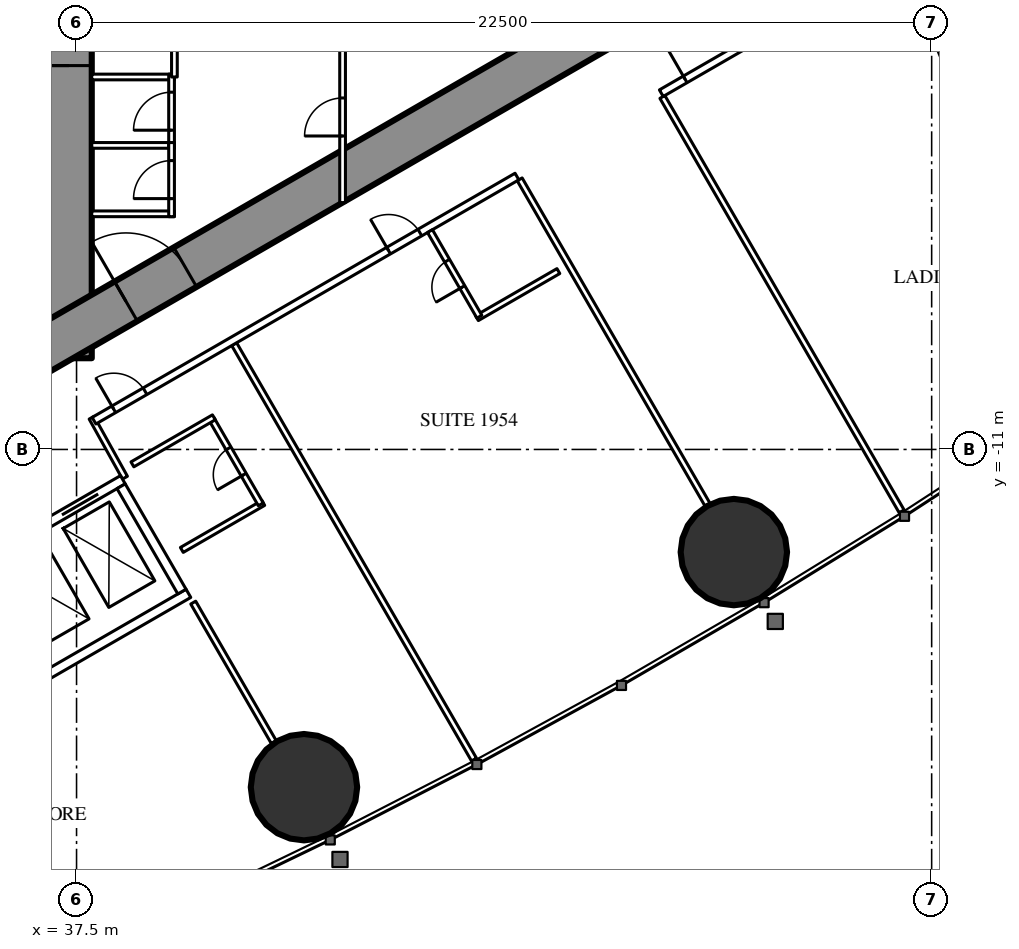
"""IFC4 building model, lengths in metres.
Left out: names, types, materials, properties, quantities, classifications, styles, units other than length and angle.
Written with IfcOpenShell. Run it as: python <this file> out.ifc"""

import sys

from ifc_helpers import new_model, si_unit, direction, frame, frame_2d, origin, origin_2d, place, context, subcontext, project, spatial, rectangle, hollow_circle, extrude, element, fill, save


model = new_model("IFC4")
c1 = context("Model", 3, precision=1e-05, world=origin(), true_north=direction((0.0, 1.0)))
c2 = subcontext(c1, "Body", "Model", "MODEL_VIEW")
j1 = project(units=[si_unit("LENGTHUNIT", "METRE"), si_unit("PLANEANGLEUNIT", "RADIAN")], contexts=[c1])
p1 = place(None, origin())
s1 = spatial("IfcSite", under=j1, at=p1, CompositionType="ELEMENT")
p2 = place(p1, origin())
s2 = spatial("IfcBuilding", under=s1, at=p2, CompositionType="ELEMENT")
p3 = place(p2, frame((0.0, 0.0, 74.0)))
s3 = spatial("IfcBuildingStorey", under=s2, at=p3, CompositionType="ELEMENT", Elevation=74.0)
for number, where, z_axis, x_axis in (
    (1, (43.484, -19.886, 0.0), (0.0, 0.0, 1.0), (1.0, 0.0, 0.0)),
    (2, (54.795, -13.701, 0.0), (0.0, 0.0, 1.0), (1.0, 0.0, 0.0)),
):
    element("IfcColumn", number, at=place(p3, frame(where, z_axis=z_axis, x_axis=x_axis)), inside=s3, PredefinedType="COLUMN", context=c2, shape_type="SweptSolid", body=[
        extrude(hollow_circle(Radius=1.4, WallThickness=0.12, at=origin_2d()), origin(), (0.0, 0.0, 1.0), 3.5),
    ])
p4 = place(p3, frame((61.5, 0.0, 0.0), z_axis=(0.0, 0.0, 1.0), x_axis=(1.0, 0.0, 0.0)))
e3 = element("IfcColumn", 3, at=p4, inside=s3, PredefinedType="COLUMN", context=c2, shape_type="SweptSolid", body=[
    extrude(hollow_circle(Radius=1.4, WallThickness=0.1, at=origin_2d()), origin(), (0.0, 0.0, 1.0), 3.5),
])
p5 = place(p3, frame((37.3, -8.6, 0.0), z_axis=(0.0, 0.0, 1.0), x_axis=(0.0, 1.0, 0.0)))
e4 = element("IfcWall", 4, at=p5, inside=s3, PredefinedType="SHEAR", context=c2, shape_type="SweptSolid", body=[
    extrude(rectangle(XDim=17.2, YDim=1.2, at=frame_2d((8.6, 0.0))), origin(), (0.0, 0.0, 1.0), 3.5),
])
p6 = place(p5, frame((7.7, 0.0, 0.0)))
e5 = element("IfcOpeningElement", 5, at=p6, cuts=e4, PredefinedType="OPENING", context=c2, shape_type="SweptSolid", body=[
    extrude(rectangle(XDim=1.8, YDim=2.2, at=frame_2d((0.9, 1.1))), frame((0.0, 0.61, 0.0), z_axis=(0.0, -1.0, 0.0), x_axis=(1.0, 0.0, 0.0)), (0.0, 0.0, 1.0), 1.22),
])
p7 = place(p3, frame((27.2, -13.8, 0.0), z_axis=(0.0, 0.0, 1.0), x_axis=(0.866027159892, 0.499996958321, 0.0)))
e6 = element("IfcWall", 6, at=p7, inside=s3, PredefinedType="SHEAR", context=c2, shape_type="SweptSolid", body=[
    extrude(rectangle(XDim=27.947, YDim=1.2, at=frame_2d((13.973, 0.0))), origin(), (0.0, 0.0, 1.0), 3.5),
])
p8 = place(p7, frame((4.6, 0.0, 0.0)))
e7 = element("IfcOpeningElement", 7, at=p8, cuts=e6, PredefinedType="OPENING", context=c2, shape_type="SweptSolid", body=[
    extrude(rectangle(XDim=1.0, YDim=2.2, at=frame_2d((0.5, 1.1))), frame((0.0, 0.61, 0.0), z_axis=(0.0, -1.0, 0.0), x_axis=(1.0, 0.0, 0.0)), (0.0, 0.0, 1.0), 1.22),
])
p9 = place(p7, frame((13.395, 0.0, 0.0)))
e8 = element("IfcOpeningElement", 8, at=p9, cuts=e6, PredefinedType="OPENING", context=c2, shape_type="SweptSolid", body=[
    extrude(rectangle(XDim=1.8, YDim=2.2, at=frame_2d((0.9, 1.1))), frame((0.0, 0.61, 0.0), z_axis=(0.0, -1.0, 0.0), x_axis=(1.0, 0.0, 0.0)), (0.0, 0.0, 1.0), 1.22),
])
p10 = place(p3, frame((41.647, -8.23, 0.0), z_axis=(0.0, 0.0, 1.0), x_axis=(0.49998590462, -0.866033541603, 0.0)))
e9 = element("IfcWall", 9, at=p10, inside=s3, PredefinedType="PARTITIONING", context=c2, shape_type="SweptSolid", body=[
    extrude(rectangle(XDim=12.621, YDim=0.15, at=frame_2d((6.311, 0.0))), origin(), (0.0, 0.0, 1.0), 3.25),
])
p11 = place(p3, frame((49.159, -3.893, 0.0), z_axis=(0.0, 0.0, 1.0), x_axis=(0.499998773722, -0.866026111775, 0.0)))
e10 = element("IfcWall", 10, at=p11, inside=s3, PredefinedType="PARTITIONING", context=c2, shape_type="SweptSolid", body=[
    extrude(rectangle(XDim=9.892, YDim=0.15, at=frame_2d((4.946, 0.0))), origin(), (0.0, 0.0, 1.0), 2.25),
])
p12 = place(p3, frame((52.915, -1.725, 0.0), z_axis=(0.0, 0.0, 1.0), x_axis=(0.499997163113, -0.866027041656, 0.0)))
e11 = element("IfcWall", 11, at=p12, inside=s3, PredefinedType="PARTITIONING", context=c2, shape_type="SweptSolid", body=[
    extrude(rectangle(XDim=12.591, YDim=0.15, at=frame_2d((6.295, 0.0))), origin(), (0.0, 0.0, 1.0), 3.25),
])
p13 = place(p3, frame((40.57, -15.03, 0.0), z_axis=(0.0, 0.0, 1.0), x_axis=(0.500012993597, -0.866017901798, 0.0)))
e12 = element("IfcWall", 12, at=p13, inside=s3, PredefinedType="PARTITIONING", context=c2, shape_type="SweptSolid", body=[
    extrude(rectangle(XDim=4.243, YDim=0.15, at=frame_2d((2.122, 0.0))), origin(), (0.0, 0.0, 1.0), 3.25),
])
p14 = place(p3, frame((38.773, -11.742, 0.0), z_axis=(0.0, 0.0, 1.0), x_axis=(-0.485528096672, 0.8742210632, 0.0)))
e13 = element("IfcWall", 13, at=p14, inside=s3, PredefinedType="PARTITIONING", context=c2, shape_type="SweptSolid", body=[
    extrude(rectangle(XDim=1.805, YDim=0.15, at=frame_2d((0.903, 0.0))), origin(), (0.0, 0.0, 1.0), 3.25),
])
p15 = place(p3, frame((37.96, -10.243, 0.0), z_axis=(0.0, 0.0, 1.0), x_axis=(0.866030548046, 0.499991089772, 0.0)))
e14 = element("IfcWall", 14, at=p15, inside=s3, PredefinedType="PARTITIONING", context=c2, shape_type="SweptSolid", body=[
    extrude(rectangle(XDim=12.849, YDim=0.2, at=frame_2d((6.425, 0.0))), origin(), (0.0, 0.0, 1.0), 3.25),
])
p16 = place(p15, frame((8.949, 0.0, 0.0)))
e15 = element("IfcOpeningElement", 15, at=p16, cuts=e14, PredefinedType="OPENING", context=c2, shape_type="SweptSolid", body=[
    extrude(rectangle(XDim=0.95, YDim=2.2, at=frame_2d((0.475, 1.1))), frame((0.0, 0.11, 0.0), z_axis=(0.0, -1.0, 0.0), x_axis=(1.0, 0.0, 0.0)), (0.0, 0.0, 1.0), 0.22),
])
p17 = place(p15, frame((0.6, 0.0, 0.0)))
e16 = element("IfcOpeningElement", 16, at=p17, cuts=e14, PredefinedType="OPENING", context=c2, shape_type="SweptSolid", body=[
    extrude(rectangle(XDim=0.95, YDim=2.2, at=frame_2d((0.475, 1.1))), frame((0.0, 0.11, 0.0), z_axis=(0.0, -1.0, 0.0), x_axis=(1.0, 0.0, 0.0)), (0.0, 0.0, 1.0), 0.22),
])
p18 = place(p3, frame((52.886, -1.626, 0.0), z_axis=(0.0, 0.0, 1.0), x_axis=(0.866030540913, 0.499991102127, 0.0)))
e17 = element("IfcWall", 17, at=p18, inside=s3, PredefinedType="PARTITIONING", context=c2, shape_type="SweptSolid", body=[
    extrude(rectangle(XDim=3.251, YDim=0.2, at=frame_2d((1.626, 0.0))), origin(), (0.0, 0.0, 1.0), 3.25),
])
p19 = place(p18, frame((0.726, 0.0, 0.0)))
e18 = element("IfcOpeningElement", 18, at=p19, cuts=e17, PredefinedType="OPENING", context=c2, shape_type="SweptSolid", body=[
    extrude(rectangle(XDim=1.8, YDim=2.2, at=frame_2d((0.9, 1.1))), frame((0.0, 0.11, 0.0), z_axis=(0.0, -1.0, 0.0), x_axis=(1.0, 0.0, 0.0)), (0.0, 0.0, 1.0), 0.22),
])
p20 = place(p3, frame((48.035, -7.545, 0.0), z_axis=(0.0, 0.0, 1.0), x_axis=(0.866006523861, 0.500032699561, 0.0)))
e19 = element("IfcWall", 19, at=p20, inside=s3, PredefinedType="PARTITIONING", context=c2, shape_type="SweptSolid", body=[
    extrude(rectangle(XDim=2.475, YDim=0.15, at=frame_2d((1.237, 0.0))), origin(), (0.0, 0.0, 1.0), 3.25),
])
p21 = place(p3, frame((46.8, -5.255, 0.0), z_axis=(0.0, 0.0, 1.0), x_axis=(0.500006934395, -0.866021400173, 0.0)))
e20 = element("IfcWall", 20, at=p21, inside=s3, PredefinedType="PARTITIONING", context=c2, shape_type="SweptSolid", body=[
    extrude(rectangle(XDim=2.6, YDim=0.15, at=frame_2d((1.3, 0.0))), origin(), (0.0, 0.0, 1.0), 3.25),
])
p22 = place(p21, frame((0.9, 0.0, 0.0)))
e21 = element("IfcOpeningElement", 21, at=p22, cuts=e20, PredefinedType="OPENING", context=c2, shape_type="SweptSolid", body=[
    extrude(rectangle(XDim=0.8, YDim=2.2, at=frame_2d((0.4, 1.1))), frame((0.0, 0.085, 0.0), z_axis=(0.0, -1.0, 0.0), x_axis=(1.0, 0.0, 0.0)), (0.0, 0.0, 1.0), 0.17),
])
p23 = place(p3, frame((40.27, -13.644, 0.0), z_axis=(0.0, 0.0, 1.0), x_axis=(0.866031185235, 0.4999899861, 0.0)))
e22 = element("IfcWall", 22, at=p23, inside=s3, PredefinedType="PARTITIONING", context=c2, shape_type="SweptSolid", body=[
    extrude(rectangle(XDim=2.475, YDim=0.15, at=frame_2d((1.238, 0.0))), origin(), (0.0, 0.0, 1.0), 3.25),
])
p24 = place(p3, frame((41.048, -10.193, 0.0), z_axis=(0.0, 0.0, 1.0), x_axis=(0.500047596559, -0.865997922154, 0.0)))
e23 = element("IfcWall", 23, at=p24, inside=s3, PredefinedType="PARTITIONING", context=c2, shape_type="SweptSolid", body=[
    extrude(rectangle(XDim=2.6, YDim=0.15, at=frame_2d((1.3, 0.0))), origin(), (0.0, 0.0, 1.0), 3.25),
])
p25 = place(p24, frame((0.9, 0.0, 0.0)))
e24 = element("IfcOpeningElement", 24, at=p25, cuts=e23, PredefinedType="OPENING", context=c2, shape_type="SweptSolid", body=[
    extrude(rectangle(XDim=0.8, YDim=2.2, at=frame_2d((0.4, 1.1))), frame((0.0, 0.085, 0.0), z_axis=(0.0, -1.0, 0.0), x_axis=(1.0, 0.0, 0.0)), (0.0, 0.0, 1.0), 0.17),
])
p26 = place(p3, frame((38.97, -11.393, 0.0), z_axis=(0.0, 0.0, 1.0), x_axis=(0.866031185235, 0.4999899861, 0.0)))
e25 = element("IfcWall", 25, at=p26, inside=s3, PredefinedType="PARTITIONING", context=c2, shape_type="SweptSolid", body=[
    extrude(rectangle(XDim=2.475, YDim=0.15, at=frame_2d((1.238, 0.0))), origin(), (0.0, 0.0, 1.0), 3.25),
])
for number, where, z_axis, x_axis in (
    (26, (37.9, -1.2, 0.0), (0.0, 0.0, 1.0), (1.0, 0.0, 0.0)),
    (27, (37.9, -3.0, 0.0), (0.0, 0.0, 1.0), (1.0, 0.0, 0.0)),
    (28, (37.9, -4.8, 0.0), (0.0, 0.0, 1.0), (1.0, 0.0, 0.0)),
):
    element("IfcWall", number, at=place(p3, frame(where, z_axis=z_axis, x_axis=x_axis)), inside=s3, PredefinedType="PARTITIONING", context=c2, shape_type="SweptSolid", body=[
        extrude(rectangle(XDim=2.175, YDim=0.15, at=frame_2d((1.087, 0.0))), origin(), (0.0, 0.0, 1.0), 3.25),
    ])
p27 = place(p3, frame((40.0, -3.075, 0.0), z_axis=(0.0, 0.0, 1.0), x_axis=(0.0, 1.0, 0.0)))
e29 = element("IfcWall", 29, at=p27, inside=s3, PredefinedType="PARTITIONING", context=c2, shape_type="SweptSolid", body=[
    extrude(rectangle(XDim=1.95, YDim=0.15, at=frame_2d((0.975, 0.0))), origin(), (0.0, 0.0, 1.0), 3.25),
])
p28 = place(p27, frame((0.475, 0.0, 0.0)))
e30 = element("IfcOpeningElement", 30, at=p28, cuts=e29, PredefinedType="OPENING", context=c2, shape_type="SweptSolid", body=[
    extrude(rectangle(XDim=1.0, YDim=2.2, at=frame_2d((0.5, 1.1))), frame((0.0, 0.085, 0.0), z_axis=(0.0, -1.0, 0.0), x_axis=(1.0, 0.0, 0.0)), (0.0, 0.0, 1.0), 0.17),
])
p29 = place(p3, frame((40.0, -4.875, 0.0), z_axis=(0.0, 0.0, 1.0), x_axis=(0.0, 1.0, 0.0)))
e31 = element("IfcWall", 31, at=p29, inside=s3, PredefinedType="PARTITIONING", context=c2, shape_type="SweptSolid", body=[
    extrude(rectangle(XDim=1.95, YDim=0.15, at=frame_2d((0.975, 0.0))), origin(), (0.0, 0.0, 1.0), 3.25),
])
p30 = place(p29, frame((0.475, 0.0, 0.0)))
e32 = element("IfcOpeningElement", 32, at=p30, cuts=e31, PredefinedType="OPENING", context=c2, shape_type="SweptSolid", body=[
    extrude(rectangle(XDim=1.0, YDim=2.2, at=frame_2d((0.5, 1.1))), frame((0.0, 0.085, 0.0), z_axis=(0.0, -1.0, 0.0), x_axis=(1.0, 0.0, 0.0)), (0.0, 0.0, 1.0), 0.17),
])
p31 = place(p3, frame((40.075, -1.2, 0.0), z_axis=(0.0, 0.0, 1.0), x_axis=(0.0, 1.0, 0.0)))
e33 = element("IfcWall", 33, at=p31, inside=s3, PredefinedType="PARTITIONING", context=c2, shape_type="SweptSolid", body=[
    extrude(rectangle(XDim=6.874, YDim=0.15, at=frame_2d((3.437, 0.0))), origin(), (0.0, 0.0, 1.0), 3.25),
])
p32 = place(p31, frame((2.537, 0.0, 0.0)))
e34 = element("IfcOpeningElement", 34, at=p32, cuts=e33, PredefinedType="OPENING", context=c2, shape_type="SweptSolid", body=[
    extrude(rectangle(XDim=1.8, YDim=2.2, at=frame_2d((0.9, 1.1))), frame((0.0, 0.085, 0.0), z_axis=(0.0, -1.0, 0.0), x_axis=(1.0, 0.0, 0.0)), (0.0, 0.0, 1.0), 0.17),
])
p33 = place(p3, frame((44.5, -4.505, 0.0), z_axis=(0.0, 0.0, 1.0), x_axis=(0.0, 1.0, 0.0)))
e35 = element("IfcWall", 35, at=p33, inside=s3, PredefinedType="PARTITIONING", context=c2, shape_type="SweptSolid", body=[
    extrude(rectangle(XDim=9.009, YDim=0.15, at=frame_2d((4.505, 0.0))), origin(), (0.0, 0.0, 1.0), 2.45),
])
p34 = place(p33, frame((1.752, 0.0, 0.0)))
e36 = element("IfcOpeningElement", 36, at=p34, cuts=e35, PredefinedType="OPENING", context=c2, shape_type="SweptSolid", body=[
    extrude(rectangle(XDim=1.0, YDim=2.2, at=frame_2d((0.5, 1.1))), frame((0.0, 0.085, 0.0), z_axis=(0.0, -1.0, 0.0), x_axis=(1.0, 0.0, 0.0)), (0.0, 0.0, 1.0), 0.17),
])
p35 = place(p33, frame((6.257, 0.0, 0.0)))
e37 = element("IfcOpeningElement", 37, at=p35, cuts=e35, PredefinedType="OPENING", context=c2, shape_type="SweptSolid", body=[
    extrude(rectangle(XDim=1.0, YDim=2.2, at=frame_2d((0.5, 1.1))), frame((0.0, 0.085, 0.0), z_axis=(0.0, -1.0, 0.0), x_axis=(1.0, 0.0, 0.0)), (0.0, 0.0, 1.0), 0.17),
])
p36 = place(p3, frame((31.271, -16.097, 0.0), z_axis=(0.0, 0.0, 1.0), x_axis=(0.86604045752, 0.499973925258, 0.0)))
e38 = element("IfcWall", 38, at=p36, inside=s3, PredefinedType="PARTITIONING", context=c2, shape_type="SweptSolid", body=[
    extrude(rectangle(XDim=8.6, YDim=0.25, at=frame_2d((4.3, 0.0))), origin(), (0.0, 0.0, 1.0), 3.25),
])
p37 = place(p36, frame((0.75, 0.0, 0.0)))
e39 = element("IfcOpeningElement", 39, at=p37, cuts=e38, PredefinedType="OPENING", context=c2, shape_type="SweptSolid", body=[
    extrude(rectangle(XDim=1.1, YDim=2.2, at=frame_2d((0.55, 1.1))), frame((0.0, 0.135, 0.0), z_axis=(0.0, -1.0, 0.0), x_axis=(1.0, 0.0, 0.0)), (0.0, 0.0, 1.0), 0.27),
])
p38 = place(p36, frame((2.75, 0.0, 0.0)))
e40 = element("IfcOpeningElement", 40, at=p38, cuts=e38, PredefinedType="OPENING", context=c2, shape_type="SweptSolid", body=[
    extrude(rectangle(XDim=1.1, YDim=2.2, at=frame_2d((0.55, 1.1))), frame((0.0, 0.135, 0.0), z_axis=(0.0, -1.0, 0.0), x_axis=(1.0, 0.0, 0.0)), (0.0, 0.0, 1.0), 0.27),
])
p39 = place(p36, frame((4.75, 0.0, 0.0)))
e41 = element("IfcOpeningElement", 41, at=p39, cuts=e38, PredefinedType="OPENING", context=c2, shape_type="SweptSolid", body=[
    extrude(rectangle(XDim=1.1, YDim=2.2, at=frame_2d((0.55, 1.1))), frame((0.0, 0.135, 0.0), z_axis=(0.0, -1.0, 0.0), x_axis=(1.0, 0.0, 0.0)), (0.0, 0.0, 1.0), 0.27),
])
p40 = place(p36, frame((6.75, 0.0, 0.0)))
e42 = element("IfcOpeningElement", 42, at=p40, cuts=e38, PredefinedType="OPENING", context=c2, shape_type="SweptSolid", body=[
    extrude(rectangle(XDim=1.1, YDim=2.2, at=frame_2d((0.55, 1.1))), frame((0.0, 0.135, 0.0), z_axis=(0.0, -1.0, 0.0), x_axis=(1.0, 0.0, 0.0)), (0.0, 0.0, 1.0), 0.27),
])
p41 = place(p3, frame((32.996, -19.086, 0.0), z_axis=(0.0, 0.0, 1.0), x_axis=(0.866028165386, 0.499995216735, 0.0)))
e43 = element("IfcWall", 43, at=p41, inside=s3, PredefinedType="PARTITIONING", context=c2, shape_type="SweptSolid", body=[
    extrude(rectangle(XDim=8.6, YDim=0.25, at=frame_2d((4.3, 0.0))), origin(), (0.0, 0.0, 1.0), 3.25),
])
p42 = place(p3, frame((38.673, -11.968, 0.0), z_axis=(0.0, 0.0, 1.0), x_axis=(0.499929347863, -0.866066190972, 0.0)))
e44 = element("IfcWall", 44, at=p42, inside=s3, PredefinedType="PARTITIONING", context=c2, shape_type="SweptSolid", body=[
    extrude(rectangle(XDim=3.201, YDim=0.25, at=frame_2d((1.6, 0.0))), origin(), (0.0, 0.0, 1.0), 3.25),
])
p43 = place(p22, origin())
e45 = element("IfcDoor", 45, at=p43, inside=s3, OperationType="SINGLE_SWING_RIGHT", PredefinedType="DOOR", context=c2, shape_type="SweptSolid", body=[
    extrude(rectangle(XDim=0.8, YDim=2.2, at=frame_2d((0.4, 1.1))), frame((0.0, 0.025, 0.0), z_axis=(0.0, -1.0, 0.0), x_axis=(1.0, 0.0, 0.0)), (0.0, 0.0, 1.0), 0.05),
])
fill(e21, e45)
p44 = place(p16, origin())
e46 = element("IfcDoor", 46, at=p44, inside=s3, OperationType="SINGLE_SWING_LEFT", PredefinedType="DOOR", context=c2, shape_type="SweptSolid", body=[
    extrude(rectangle(XDim=0.95, YDim=2.2, at=frame_2d((0.475, 1.1))), frame((0.0, 0.025, 0.0), z_axis=(0.0, -1.0, 0.0), x_axis=(1.0, 0.0, 0.0)), (0.0, 0.0, 1.0), 0.05),
])
fill(e15, e46)
p45 = place(p19, origin())
e47 = element("IfcDoor", 47, at=p45, inside=s3, OperationType="DOUBLE_DOOR_SINGLE_SWING", PredefinedType="DOOR", context=c2, shape_type="SweptSolid", body=[
    extrude(rectangle(XDim=1.8, YDim=2.2, at=frame_2d((0.9, 1.1))), frame((0.0, 0.025, 0.0), z_axis=(0.0, -1.0, 0.0), x_axis=(1.0, 0.0, 0.0)), (0.0, 0.0, 1.0), 0.05),
])
fill(e18, e47)
p46 = place(p25, origin())
e48 = element("IfcDoor", 48, at=p46, inside=s3, OperationType="SINGLE_SWING_RIGHT", PredefinedType="DOOR", context=c2, shape_type="SweptSolid", body=[
    extrude(rectangle(XDim=0.8, YDim=2.2, at=frame_2d((0.4, 1.1))), frame((0.0, 0.025, 0.0), z_axis=(0.0, -1.0, 0.0), x_axis=(1.0, 0.0, 0.0)), (0.0, 0.0, 1.0), 0.05),
])
fill(e24, e48)
p47 = place(p17, origin())
e49 = element("IfcDoor", 49, at=p47, inside=s3, OperationType="SINGLE_SWING_LEFT", PredefinedType="DOOR", context=c2, shape_type="SweptSolid", body=[
    extrude(rectangle(XDim=0.95, YDim=2.2, at=frame_2d((0.475, 1.1))), frame((0.0, 0.025, 0.0), z_axis=(0.0, -1.0, 0.0), x_axis=(1.0, 0.0, 0.0)), (0.0, 0.0, 1.0), 0.05),
])
fill(e16, e49)
p48 = place(p28, origin())
e50 = element("IfcDoor", 50, at=p48, inside=s3, OperationType="SINGLE_SWING_LEFT", PredefinedType="DOOR", context=c2, shape_type="SweptSolid", body=[
    extrude(rectangle(XDim=1.0, YDim=2.2, at=frame_2d((0.5, 1.1))), frame((0.0, 0.025, 0.0), z_axis=(0.0, -1.0, 0.0), x_axis=(1.0, 0.0, 0.0)), (0.0, 0.0, 1.0), 0.05),
])
fill(e30, e50)
p49 = place(p30, origin())
e51 = element("IfcDoor", 51, at=p49, inside=s3, OperationType="SINGLE_SWING_LEFT", PredefinedType="DOOR", context=c2, shape_type="SweptSolid", body=[
    extrude(rectangle(XDim=1.0, YDim=2.2, at=frame_2d((0.5, 1.1))), frame((0.0, 0.025, 0.0), z_axis=(0.0, -1.0, 0.0), x_axis=(1.0, 0.0, 0.0)), (0.0, 0.0, 1.0), 0.05),
])
fill(e32, e51)
p50 = place(p34, origin())
e52 = element("IfcDoor", 52, at=p50, inside=s3, OperationType="SINGLE_SWING_LEFT", PredefinedType="DOOR", context=c2, shape_type="SweptSolid", body=[
    extrude(rectangle(XDim=1.0, YDim=2.2, at=frame_2d((0.5, 1.1))), frame((0.0, 0.025, 0.0), z_axis=(0.0, -1.0, 0.0), x_axis=(1.0, 0.0, 0.0)), (0.0, 0.0, 1.0), 0.05),
])
fill(e36, e52)
p51 = place(p9, origin())
e53 = element("IfcDoor", 53, at=p51, inside=s3, OperationType="DOUBLE_DOOR_SINGLE_SWING", PredefinedType="DOOR", context=c2, shape_type="SweptSolid", body=[
    extrude(rectangle(XDim=1.8, YDim=2.2, at=frame_2d((0.9, 1.1))), frame((0.0, 0.025, 0.0), z_axis=(0.0, -1.0, 0.0), x_axis=(1.0, 0.0, 0.0)), (0.0, 0.0, 1.0), 0.05),
])
fill(e8, e53)
p52 = place(p6, origin())
e54 = element("IfcDoor", 54, at=p52, inside=s3, OperationType="DOUBLE_DOOR_SINGLE_SWING", PredefinedType="DOOR", context=c2, shape_type="SweptSolid", body=[
    extrude(rectangle(XDim=1.8, YDim=2.2, at=frame_2d((0.9, 1.1))), frame((0.0, 0.025, 0.0), z_axis=(0.0, -1.0, 0.0), x_axis=(1.0, 0.0, 0.0)), (0.0, 0.0, 1.0), 0.05),
])
fill(e5, e54)
p53 = place(p40, origin())
e55 = element("IfcDoor", 55, at=p53, inside=s3, OperationType="DOUBLE_DOOR_SLIDING", PredefinedType="USERDEFINED", context=c2, shape_type="SweptSolid", body=[
    extrude(rectangle(XDim=1.1, YDim=2.2, at=frame_2d((0.55, 1.1))), frame((0.0, 0.025, 0.0), z_axis=(0.0, -1.0, 0.0), x_axis=(1.0, 0.0, 0.0)), (0.0, 0.0, 1.0), 0.05),
])
fill(e42, e55)
save(model, sys.argv[1])
